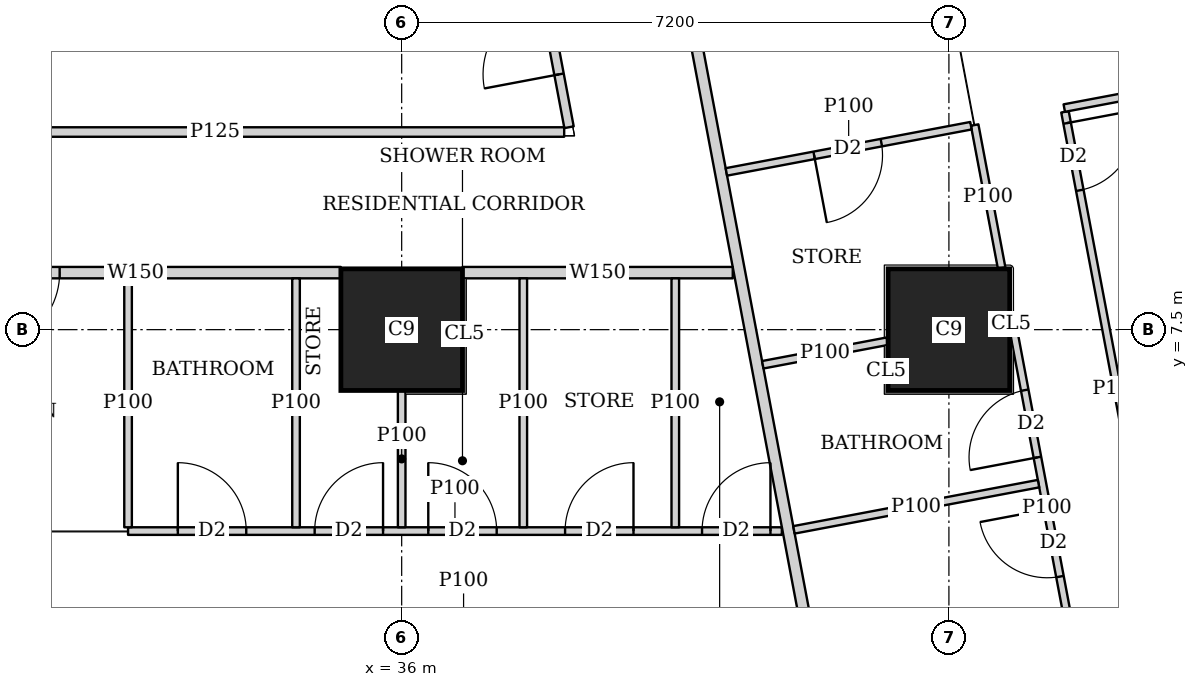
"""IFC4 building model, lengths in metres.
Left out: names, types, materials, properties, quantities, classifications, styles, units other than length and angle.
Written with IfcOpenShell. Run it as: python <this file> out.ifc"""

import sys

from ifc_helpers import new_model, si_unit, direction, frame, frame_2d, origin, origin_2d, place, context, subcontext, project, spatial, rectangle, extrude, element, fill, save


model = new_model("IFC4")
c1 = context("Model", 3, precision=1e-05, world=origin(), true_north=direction((0.0, 1.0)))
c2 = subcontext(c1, "Body", "Model", "MODEL_VIEW")
j1 = project(units=[si_unit("LENGTHUNIT", "METRE"), si_unit("PLANEANGLEUNIT", "RADIAN")], contexts=[c1])
p1 = place(None, origin())
s1 = spatial("IfcSite", under=j1, at=p1, CompositionType="ELEMENT")
p2 = place(p1, origin())
s2 = spatial("IfcBuilding", under=s1, at=p2, CompositionType="ELEMENT")
p3 = place(p2, frame((0.0, 0.0, 77.9)))
s3 = spatial("IfcBuildingStorey", under=s2, at=p3, CompositionType="ELEMENT", Elevation=77.9)
for number, where, z_axis, x_axis in (
    (1, (36.0, 7.5, 0.0), (0.0, 0.0, 1.0), (1.0, 0.0, 0.0)),
    (2, (43.2, 7.5, 0.0), (0.0, 0.0, 1.0), (1.0, 0.0, 0.0)),
):
    element("IfcColumn", number, at=place(p3, frame(where, z_axis=z_axis, x_axis=x_axis)), inside=s3, PredefinedType="COLUMN", context=c2, shape_type="SweptSolid", body=[
        extrude(rectangle(XDim=1.6, YDim=1.6, at=origin_2d()), origin(), (0.0, 0.0, 1.0), 3.75),
    ])
p4 = place(p3, frame((50.653, 2.703, 0.0), z_axis=(0.0, 0.0, 1.0), x_axis=(-0.185612026696, 0.982623109613, 0.0)))
e3 = element("IfcWall", 3, at=p4, inside=s3, PredefinedType="SOLIDWALL", context=c2, shape_type="SweptSolid", body=[
    extrude(rectangle(XDim=41.393, YDim=0.2, at=frame_2d((20.697, 0.0))), origin(), (0.0, 0.0, 1.0), 3.5),
])
p5 = place(p4, frame((1.633, 0.0, 0.9)))
e4 = element("IfcOpeningElement", 4, at=p5, cuts=e3, PredefinedType="OPENING", context=c2, shape_type="SweptSolid", body=[
    extrude(rectangle(XDim=1.8, YDim=1.5, at=frame_2d((0.9, 0.75))), frame((0.0, 0.11, 0.0), z_axis=(0.0, -1.0, 0.0), x_axis=(1.0, 0.0, 0.0)), (0.0, 0.0, 1.0), 0.22),
])
p6 = place(p4, frame((6.032, 0.0, 0.9)))
e5 = element("IfcOpeningElement", 5, at=p6, cuts=e3, PredefinedType="OPENING", context=c2, shape_type="SweptSolid", body=[
    extrude(rectangle(XDim=1.8, YDim=1.5, at=frame_2d((0.9, 0.75))), frame((0.0, 0.11, 0.0), z_axis=(0.0, -1.0, 0.0), x_axis=(1.0, 0.0, 0.0)), (0.0, 0.0, 1.0), 0.22),
])
p7 = place(p4, frame((9.848, 0.0, 0.9)))
e6 = element("IfcOpeningElement", 6, at=p7, cuts=e3, PredefinedType="OPENING", context=c2, shape_type="SweptSolid", body=[
    extrude(rectangle(XDim=1.8, YDim=1.5, at=frame_2d((0.9, 0.75))), frame((0.0, 0.11, 0.0), z_axis=(0.0, -1.0, 0.0), x_axis=(1.0, 0.0, 0.0)), (0.0, 0.0, 1.0), 0.22),
])
p8 = place(p4, frame((13.664, 0.0, 0.9)))
e7 = element("IfcOpeningElement", 7, at=p8, cuts=e3, PredefinedType="OPENING", context=c2, shape_type="SweptSolid", body=[
    extrude(rectangle(XDim=1.8, YDim=1.5, at=frame_2d((0.9, 0.75))), frame((0.0, 0.11, 0.0), z_axis=(0.0, -1.0, 0.0), x_axis=(1.0, 0.0, 0.0)), (0.0, 0.0, 1.0), 0.22),
])
p9 = place(p4, frame((17.481, 0.0, 0.9)))
e8 = element("IfcOpeningElement", 8, at=p9, cuts=e3, PredefinedType="OPENING", context=c2, shape_type="SweptSolid", body=[
    extrude(rectangle(XDim=1.8, YDim=1.5, at=frame_2d((0.9, 0.75))), frame((0.0, 0.11, 0.0), z_axis=(0.0, -1.0, 0.0), x_axis=(1.0, 0.0, 0.0)), (0.0, 0.0, 1.0), 0.22),
])
p10 = place(p4, frame((21.297, 0.0, 0.9)))
e9 = element("IfcOpeningElement", 9, at=p10, cuts=e3, PredefinedType="OPENING", context=c2, shape_type="SweptSolid", body=[
    extrude(rectangle(XDim=1.8, YDim=1.5, at=frame_2d((0.9, 0.75))), frame((0.0, 0.11, 0.0), z_axis=(0.0, -1.0, 0.0), x_axis=(1.0, 0.0, 0.0)), (0.0, 0.0, 1.0), 0.22),
])
p11 = place(p4, frame((25.113, 0.0, 0.9)))
e10 = element("IfcOpeningElement", 10, at=p11, cuts=e3, PredefinedType="OPENING", context=c2, shape_type="SweptSolid", body=[
    extrude(rectangle(XDim=1.8, YDim=1.5, at=frame_2d((0.9, 0.75))), frame((0.0, 0.11, 0.0), z_axis=(0.0, -1.0, 0.0), x_axis=(1.0, 0.0, 0.0)), (0.0, 0.0, 1.0), 0.22),
])
p12 = place(p4, frame((28.93, 0.0, 0.9)))
e11 = element("IfcOpeningElement", 11, at=p12, cuts=e3, PredefinedType="OPENING", context=c2, shape_type="SweptSolid", body=[
    extrude(rectangle(XDim=1.8, YDim=1.5, at=frame_2d((0.9, 0.75))), frame((0.0, 0.11, 0.0), z_axis=(0.0, -1.0, 0.0), x_axis=(1.0, 0.0, 0.0)), (0.0, 0.0, 1.0), 0.22),
])
p13 = place(p4, frame((32.746, 0.0, 0.9)))
e12 = element("IfcOpeningElement", 12, at=p13, cuts=e3, PredefinedType="OPENING", context=c2, shape_type="SweptSolid", body=[
    extrude(rectangle(XDim=1.8, YDim=1.5, at=frame_2d((0.9, 0.75))), frame((0.0, 0.11, 0.0), z_axis=(0.0, -1.0, 0.0), x_axis=(1.0, 0.0, 0.0)), (0.0, 0.0, 1.0), 0.22),
])
p14 = place(p4, frame((36.481, 0.0, 0.9)))
e13 = element("IfcOpeningElement", 13, at=p14, cuts=e3, PredefinedType="OPENING", context=c2, shape_type="SweptSolid", body=[
    extrude(rectangle(XDim=1.8, YDim=1.5, at=frame_2d((0.9, 0.75))), frame((0.0, 0.11, 0.0), z_axis=(0.0, -1.0, 0.0), x_axis=(1.0, 0.0, 0.0)), (0.0, 0.0, 1.0), 0.22),
])
p15 = place(p3, frame((40.356, 8.25, 0.0), z_axis=(0.0, 0.0, 1.0), x_axis=(-1.0, 0.0, 0.0)))
e14 = element("IfcWall", 14, at=p15, inside=s3, PredefinedType="SOLIDWALL", context=c2, shape_type="SweptSolid", body=[
    extrude(rectangle(XDim=3.555, YDim=0.15, at=frame_2d((1.777, 0.0))), origin(), (0.0, 0.0, 1.0), 3.5),
])
p16 = place(p3, frame((35.199, 8.25, 0.0), z_axis=(0.0, 0.0, 1.0), x_axis=(-1.0, 0.0, 0.0)))
e15 = element("IfcWall", 15, at=p16, inside=s3, PredefinedType="SOLIDWALL", context=c2, shape_type="SweptSolid", body=[
    extrude(rectangle(XDim=5.398, YDim=0.15, at=frame_2d((2.699, 0.0))), origin(), (0.0, 0.0, 1.0), 3.5),
])
p17 = place(p16, frame((3.699, 0.0, 0.0)))
e16 = element("IfcOpeningElement", 16, at=p17, cuts=e15, PredefinedType="OPENING", context=c2, shape_type="SweptSolid", body=[
    extrude(rectangle(XDim=1.0, YDim=2.1, at=frame_2d((0.5, 1.05))), frame((0.0, 0.085, 0.0), z_axis=(0.0, -1.0, 0.0), x_axis=(1.0, 0.0, 0.0)), (0.0, 0.0, 1.0), 0.17),
])
p18 = place(p3, frame((33.382, 45.65, 0.0), z_axis=(0.0, 0.0, 1.0), x_axis=(0.185593544777, -0.982626600565, 0.0)))
e17 = element("IfcWall", 17, at=p18, inside=s3, PredefinedType="SOLIDWALL", context=c2, shape_type="SweptSolid", body=[
    extrude(rectangle(XDim=47.118, YDim=0.15, at=frame_2d((23.559, 0.0))), origin(), (0.0, 0.0, 1.0), 2.2),
])
p19 = place(p18, frame((19.054, 0.0, 0.0)))
e18 = element("IfcOpeningElement", 18, at=p19, cuts=e17, PredefinedType="OPENING", context=c2, shape_type="SweptSolid", body=[
    extrude(rectangle(XDim=1.0, YDim=2.1, at=frame_2d((0.5, 1.05))), frame((0.0, 0.085, 0.0), z_axis=(0.0, -1.0, 0.0), x_axis=(1.0, 0.0, 0.0)), (0.0, 0.0, 1.0), 0.17),
])
p20 = place(p18, frame((22.87, 0.0, 0.0)))
e19 = element("IfcOpeningElement", 19, at=p20, cuts=e17, PredefinedType="OPENING", context=c2, shape_type="SweptSolid", body=[
    extrude(rectangle(XDim=1.0, YDim=2.1, at=frame_2d((0.5, 1.05))), frame((0.0, 0.085, 0.0), z_axis=(0.0, -1.0, 0.0), x_axis=(1.0, 0.0, 0.0)), (0.0, 0.0, 1.0), 0.17),
])
p21 = place(p18, frame((33.833, 0.0, 0.0)))
e20 = element("IfcOpeningElement", 20, at=p21, cuts=e17, PredefinedType="OPENING", context=c2, shape_type="SweptSolid", body=[
    extrude(rectangle(XDim=1.0, YDim=2.1, at=frame_2d((0.5, 1.05))), frame((0.0, 0.085, 0.0), z_axis=(0.0, -1.0, 0.0), x_axis=(1.0, 0.0, 0.0)), (0.0, 0.0, 1.0), 0.17),
])
p22 = place(p3, frame((41.002, 4.85, 0.0), z_axis=(0.0, 0.0, 1.0), x_axis=(-1.0, 0.0, 0.0)))
e21 = element("IfcWall", 21, at=p22, inside=s3, PredefinedType="PARTITIONING", context=c2, shape_type="SweptSolid", body=[
    extrude(rectangle(XDim=8.602, YDim=0.1, at=frame_2d((4.301, 0.0))), origin(), (0.0, 0.0, 1.0), 3.5),
])
p23 = place(p22, frame((7.047, 0.0, 0.0)))
e22 = element("IfcOpeningElement", 22, at=p23, cuts=e21, PredefinedType="OPENING", context=c2, shape_type="SweptSolid", body=[
    extrude(rectangle(XDim=0.9, YDim=2.1, at=frame_2d((0.45, 1.05))), frame((0.0, 0.06, 0.0), z_axis=(0.0, -1.0, 0.0), x_axis=(1.0, 0.0, 0.0)), (0.0, 0.0, 1.0), 0.12),
])
p24 = place(p22, frame((3.752, 0.0, 0.0)))
e23 = element("IfcOpeningElement", 23, at=p24, cuts=e21, PredefinedType="OPENING", context=c2, shape_type="SweptSolid", body=[
    extrude(rectangle(XDim=0.9, YDim=2.1, at=frame_2d((0.45, 1.05))), frame((0.0, 0.06, 0.0), z_axis=(0.0, -1.0, 0.0), x_axis=(1.0, 0.0, 0.0)), (0.0, 0.0, 1.0), 0.12),
])
p25 = place(p22, frame((0.15, 0.0, 0.0)))
e24 = element("IfcOpeningElement", 24, at=p25, cuts=e21, PredefinedType="OPENING", context=c2, shape_type="SweptSolid", body=[
    extrude(rectangle(XDim=0.9, YDim=2.1, at=frame_2d((0.45, 1.05))), frame((0.0, 0.06, 0.0), z_axis=(0.0, -1.0, 0.0), x_axis=(1.0, 0.0, 0.0)), (0.0, 0.0, 1.0), 0.12),
])
p26 = place(p22, frame((5.247, 0.0, 0.0)))
e25 = element("IfcOpeningElement", 25, at=p26, cuts=e21, PredefinedType="OPENING", context=c2, shape_type="SweptSolid", body=[
    extrude(rectangle(XDim=0.9, YDim=2.1, at=frame_2d((0.45, 1.05))), frame((0.0, 0.06, 0.0), z_axis=(0.0, -1.0, 0.0), x_axis=(1.0, 0.0, 0.0)), (0.0, 0.0, 1.0), 0.12),
])
p27 = place(p22, frame((1.952, 0.0, 0.0)))
e26 = element("IfcOpeningElement", 26, at=p27, cuts=e21, PredefinedType="OPENING", context=c2, shape_type="SweptSolid", body=[
    extrude(rectangle(XDim=0.9, YDim=2.1, at=frame_2d((0.45, 1.05))), frame((0.0, 0.06, 0.0), z_axis=(0.0, -1.0, 0.0), x_axis=(1.0, 0.0, 0.0)), (0.0, 0.0, 1.0), 0.12),
])
p28 = place(p3, frame((32.4, 4.9, 0.0), z_axis=(0.0, 0.0, 1.0), x_axis=(0.0, 1.0, 0.0)))
e27 = element("IfcWall", 27, at=p28, inside=s3, PredefinedType="PARTITIONING", context=c2, shape_type="SweptSolid", body=[
    extrude(rectangle(XDim=3.275, YDim=0.1, at=frame_2d((1.638, 0.0))), origin(), (0.0, 0.0, 1.0), 3.5),
])
p29 = place(p3, frame((36.0, 4.9, 0.0), z_axis=(0.0, 0.0, 1.0), x_axis=(0.0, 1.0, 0.0)))
e28 = element("IfcWall", 28, at=p29, inside=s3, PredefinedType="PARTITIONING", context=c2, shape_type="SweptSolid", body=[
    extrude(rectangle(XDim=1.799, YDim=0.1, at=frame_2d((0.899, 0.0))), origin(), (0.0, 0.0, 1.0), 3.5),
])
for number, where, z_axis, x_axis in (
    (29, (39.6, 4.9, 0.0), (0.0, 0.0, 1.0), (0.0, 1.0, 0.0)),
    (30, (34.61, 4.9, 0.0), (0.0, 0.0, 1.0), (0.0, 1.0, 0.0)),
    (31, (37.6, 4.9, 0.0), (0.0, 0.0, 1.0), (0.0, 1.0, 0.0)),
):
    element("IfcWall", number, at=place(p3, frame(where, z_axis=z_axis, x_axis=x_axis)), inside=s3, PredefinedType="PARTITIONING", context=c2, shape_type="SweptSolid", body=[
        extrude(rectangle(XDim=3.275, YDim=0.1, at=frame_2d((1.638, 0.0))), origin(), (0.0, 0.0, 1.0), 3.5),
    ])
p30 = place(p3, frame((44.727, 10.366, 0.0), z_axis=(0.0, 0.0, 1.0), x_axis=(0.185678775129, -0.982610498858, 0.0)))
e32 = element("IfcWall", 32, at=p30, inside=s3, PredefinedType="PARTITIONING", context=c2, shape_type="SweptSolid", body=[
    extrude(rectangle(XDim=7.421, YDim=0.1, at=frame_2d((3.71, 0.0))), origin(), (0.0, 0.0, 1.0), 3.5),
])
p31 = place(p30, frame((0.151, 0.0, 0.0)))
e33 = element("IfcOpeningElement", 33, at=p31, cuts=e32, PredefinedType="OPENING", context=c2, shape_type="SweptSolid", body=[
    extrude(rectangle(XDim=0.9, YDim=2.1, at=frame_2d((0.45, 1.05))), frame((0.0, 0.06, 0.0), z_axis=(0.0, -1.0, 0.0), x_axis=(1.0, 0.0, 0.0)), (0.0, 0.0, 1.0), 0.12),
])
p32 = place(p30, frame((4.55, 0.0, 0.0)))
e34 = element("IfcOpeningElement", 34, at=p32, cuts=e32, PredefinedType="OPENING", context=c2, shape_type="SweptSolid", body=[
    extrude(rectangle(XDim=0.9, YDim=2.1, at=frame_2d((0.45, 1.05))), frame((0.0, 0.06, 0.0), z_axis=(0.0, -1.0, 0.0), x_axis=(1.0, 0.0, 0.0)), (0.0, 0.0, 1.0), 0.12),
])
p33 = place(p3, frame((43.539, 10.192, 0.0), z_axis=(0.0, 0.0, 1.0), x_axis=(0.185366049966, -0.982669541362, 0.0)))
e35 = element("IfcWall", 35, at=p33, inside=s3, PredefinedType="PARTITIONING", context=c2, shape_type="SweptSolid", body=[
    extrude(rectangle(XDim=1.915, YDim=0.1, at=frame_2d((0.958, 0.0))), origin(), (0.0, 0.0, 1.0), 3.5),
])
p34 = place(p3, frame((44.049, 7.49, 0.0), z_axis=(0.0, 0.0, 1.0), x_axis=(0.185666332607, -0.982612849975, 0.0)))
e36 = element("IfcWall", 36, at=p34, inside=s3, PredefinedType="PARTITIONING", context=c2, shape_type="SweptSolid", body=[
    extrude(rectangle(XDim=4.75, YDim=0.1, at=frame_2d((2.375, 0.0))), origin(), (0.0, 0.0, 1.0), 3.5),
])
p35 = place(p34, frame((0.8, 0.0, 0.0)))
e37 = element("IfcOpeningElement", 37, at=p35, cuts=e36, PredefinedType="OPENING", context=c2, shape_type="SweptSolid", body=[
    extrude(rectangle(XDim=0.9, YDim=2.1, at=frame_2d((0.45, 1.05))), frame((0.0, 0.06, 0.0), z_axis=(0.0, -1.0, 0.0), x_axis=(1.0, 0.0, 0.0)), (0.0, 0.0, 1.0), 0.12),
])
p36 = place(p34, frame((2.396, 0.0, 0.0)))
e38 = element("IfcOpeningElement", 38, at=p36, cuts=e36, PredefinedType="OPENING", context=c2, shape_type="SweptSolid", body=[
    extrude(rectangle(XDim=0.9, YDim=2.1, at=frame_2d((0.45, 1.05))), frame((0.0, 0.06, 0.0), z_axis=(0.0, -1.0, 0.0), x_axis=(1.0, 0.0, 0.0)), (0.0, 0.0, 1.0), 0.12),
])
p37 = place(p3, frame((48.943, 11.213, 0.0), z_axis=(0.0, 0.0, 1.0), x_axis=(-0.982633535512, -0.185556823879, 0.0)))
e39 = element("IfcWall", 39, at=p37, inside=s3, PredefinedType="PARTITIONING", context=c2, shape_type="SweptSolid", body=[
    extrude(rectangle(XDim=4.3, YDim=0.1, at=frame_2d((2.15, 0.0))), origin(), (0.0, 0.0, 1.0), 2.2),
])
p38 = place(p3, frame((43.49, 10.183, 0.0), z_axis=(0.0, 0.0, 1.0), x_axis=(-0.982607026909, -0.185697147715, 0.0)))
e40 = element("IfcWall", 40, at=p38, inside=s3, PredefinedType="PARTITIONING", context=c2, shape_type="SweptSolid", body=[
    extrude(rectangle(XDim=3.275, YDim=0.1, at=frame_2d((1.637, 0.0))), origin(), (0.0, 0.0, 1.0), 3.5),
])
p39 = place(p38, frame((1.2, 0.0, 0.0)))
e41 = element("IfcOpeningElement", 41, at=p39, cuts=e40, PredefinedType="OPENING", context=c2, shape_type="SweptSolid", body=[
    extrude(rectangle(XDim=0.9, YDim=2.1, at=frame_2d((0.45, 1.05))), frame((0.0, 0.06, 0.0), z_axis=(0.0, -1.0, 0.0), x_axis=(1.0, 0.0, 0.0)), (0.0, 0.0, 1.0), 0.12),
])
p40 = place(p3, frame((42.39, 7.348, 0.0), z_axis=(0.0, 0.0, 1.0), x_axis=(-0.9825976927, -0.185746532405, 0.0)))
e42 = element("IfcWall", 42, at=p40, inside=s3, PredefinedType="PARTITIONING", context=c2, shape_type="SweptSolid", body=[
    extrude(rectangle(XDim=1.668, YDim=0.1, at=frame_2d((0.834, 0.0))), origin(), (0.0, 0.0, 1.0), 3.5),
])
p41 = place(p3, frame((44.379, 5.474, 0.0), z_axis=(0.0, 0.0, 1.0), x_axis=(-0.982607026909, -0.185697147715, 0.0)))
e43 = element("IfcWall", 43, at=p41, inside=s3, PredefinedType="PARTITIONING", context=c2, shape_type="SweptSolid", body=[
    extrude(rectangle(XDim=3.275, YDim=0.1, at=frame_2d((1.637, 0.0))), origin(), (0.0, 0.0, 1.0), 3.5),
])
p42 = place(p3, frame((28.95, 10.1, 0.0), z_axis=(0.0, 0.0, 1.0), x_axis=(1.0, 0.0, 0.0)))
e44 = element("IfcWall", 44, at=p42, inside=s3, PredefinedType="PARTITIONING", context=c2, shape_type="SweptSolid", body=[
    extrude(rectangle(XDim=9.188, YDim=0.125, at=frame_2d((4.594, 0.0))), origin(), (0.0, 0.0, 1.0), 3.5),
])
p43 = place(p3, frame((38.202, 10.163, 0.0), z_axis=(0.0, 0.0, 1.0), x_axis=(-0.185645577403, 0.982616771479, 0.0)))
e45 = element("IfcWall", 45, at=p43, inside=s3, PredefinedType="PARTITIONING", context=c2, shape_type="SweptSolid", body=[
    extrude(rectangle(XDim=12.555, YDim=0.125, at=frame_2d((6.278, 0.0))), origin(), (0.0, 0.0, 1.0), 2.5),
])
p44 = place(p43, frame((0.708, 0.0, 0.0)))
e46 = element("IfcOpeningElement", 46, at=p44, cuts=e45, PredefinedType="OPENING", context=c2, shape_type="SweptSolid", body=[
    extrude(rectangle(XDim=1.0, YDim=2.1, at=frame_2d((0.5, 1.05))), frame((0.0, 0.073, 0.0), z_axis=(0.0, -1.0, 0.0), x_axis=(1.0, 0.0, 0.0)), (0.0, 0.0, 1.0), 0.145),
])
p45 = place(p43, frame((6.0, 0.0, 0.0)))
e47 = element("IfcOpeningElement", 47, at=p45, cuts=e45, PredefinedType="OPENING", context=c2, shape_type="SweptSolid", body=[
    extrude(rectangle(XDim=1.0, YDim=2.1, at=frame_2d((0.5, 1.05))), frame((0.0, 0.073, 0.0), z_axis=(0.0, -1.0, 0.0), x_axis=(1.0, 0.0, 0.0)), (0.0, 0.0, 1.0), 0.145),
])
p46 = place(p43, frame((9.562, 0.0, 0.0)))
e48 = element("IfcOpeningElement", 48, at=p46, cuts=e45, PredefinedType="OPENING", context=c2, shape_type="SweptSolid", body=[
    extrude(rectangle(XDim=1.0, YDim=2.1, at=frame_2d((0.5, 1.05))), frame((0.0, 0.073, 0.0), z_axis=(0.0, -1.0, 0.0), x_axis=(1.0, 0.0, 0.0)), (0.0, 0.0, 1.0), 0.145),
])
p47 = place(p23, origin())
e49 = element("IfcDoor", 49, at=p47, inside=s3, OperationType="SINGLE_SWING_LEFT", PredefinedType="DOOR", context=c2, shape_type="SweptSolid", body=[
    extrude(rectangle(XDim=0.9, YDim=2.1, at=frame_2d((0.45, 1.05))), frame((0.0, 0.025, 0.0), z_axis=(0.0, -1.0, 0.0), x_axis=(1.0, 0.0, 0.0)), (0.0, 0.0, 1.0), 0.05),
])
fill(e22, e49)
p48 = place(p24, origin())
e50 = element("IfcDoor", 50, at=p48, inside=s3, OperationType="SINGLE_SWING_LEFT", PredefinedType="DOOR", context=c2, shape_type="SweptSolid", body=[
    extrude(rectangle(XDim=0.9, YDim=2.1, at=frame_2d((0.45, 1.05))), frame((0.0, 0.025, 0.0), z_axis=(0.0, -1.0, 0.0), x_axis=(1.0, 0.0, 0.0)), (0.0, 0.0, 1.0), 0.05),
])
fill(e23, e50)
p49 = place(p25, origin())
e51 = element("IfcDoor", 51, at=p49, inside=s3, OperationType="SINGLE_SWING_RIGHT", PredefinedType="DOOR", context=c2, shape_type="SweptSolid", body=[
    extrude(rectangle(XDim=0.9, YDim=2.1, at=frame_2d((0.45, 1.05))), frame((0.0, 0.025, 0.0), z_axis=(0.0, -1.0, 0.0), x_axis=(1.0, 0.0, 0.0)), (0.0, 0.0, 1.0), 0.05),
])
fill(e24, e51)
p50 = place(p26, origin())
e52 = element("IfcDoor", 52, at=p50, inside=s3, OperationType="SINGLE_SWING_RIGHT", PredefinedType="DOOR", context=c2, shape_type="SweptSolid", body=[
    extrude(rectangle(XDim=0.9, YDim=2.1, at=frame_2d((0.45, 1.05))), frame((0.0, 0.025, 0.0), z_axis=(0.0, -1.0, 0.0), x_axis=(1.0, 0.0, 0.0)), (0.0, 0.0, 1.0), 0.05),
])
fill(e25, e52)
p51 = place(p27, origin())
e53 = element("IfcDoor", 53, at=p51, inside=s3, OperationType="SINGLE_SWING_RIGHT", PredefinedType="DOOR", context=c2, shape_type="SweptSolid", body=[
    extrude(rectangle(XDim=0.9, YDim=2.1, at=frame_2d((0.45, 1.05))), frame((0.0, 0.025, 0.0), z_axis=(0.0, -1.0, 0.0), x_axis=(1.0, 0.0, 0.0)), (0.0, 0.0, 1.0), 0.05),
])
fill(e26, e53)
p52 = place(p17, origin())
e54 = element("IfcDoor", 54, at=p52, inside=s3, OperationType="SINGLE_SWING_RIGHT", PredefinedType="DOOR", context=c2, shape_type="SweptSolid", body=[
    extrude(rectangle(XDim=1.0, YDim=2.1, at=frame_2d((0.5, 1.05))), frame((0.0, 0.025, 0.0), z_axis=(0.0, -1.0, 0.0), x_axis=(1.0, 0.0, 0.0)), (0.0, 0.0, 1.0), 0.05),
])
fill(e16, e54)
p53 = place(p31, origin())
e55 = element("IfcDoor", 55, at=p53, inside=s3, OperationType="SINGLE_SWING_LEFT", PredefinedType="DOOR", context=c2, shape_type="SweptSolid", body=[
    extrude(rectangle(XDim=0.9, YDim=2.1, at=frame_2d((0.45, 1.05))), frame((0.0, 0.025, 0.0), z_axis=(0.0, -1.0, 0.0), x_axis=(1.0, 0.0, 0.0)), (0.0, 0.0, 1.0), 0.05),
])
fill(e33, e55)
p54 = place(p35, origin())
e56 = element("IfcDoor", 56, at=p54, inside=s3, OperationType="SINGLE_SWING_LEFT", PredefinedType="DOOR", context=c2, shape_type="SweptSolid", body=[
    extrude(rectangle(XDim=0.9, YDim=2.1, at=frame_2d((0.45, 1.05))), frame((0.0, 0.025, 0.0), z_axis=(0.0, -1.0, 0.0), x_axis=(1.0, 0.0, 0.0)), (0.0, 0.0, 1.0), 0.05),
])
fill(e37, e56)
p55 = place(p36, origin())
e57 = element("IfcDoor", 57, at=p55, inside=s3, OperationType="SINGLE_SWING_RIGHT", PredefinedType="DOOR", context=c2, shape_type="SweptSolid", body=[
    extrude(rectangle(XDim=0.9, YDim=2.1, at=frame_2d((0.45, 1.05))), frame((0.0, 0.025, 0.0), z_axis=(0.0, -1.0, 0.0), x_axis=(1.0, 0.0, 0.0)), (0.0, 0.0, 1.0), 0.05),
])
fill(e38, e57)
p56 = place(p39, origin())
e58 = element("IfcDoor", 58, at=p56, inside=s3, OperationType="SINGLE_SWING_RIGHT", PredefinedType="DOOR", context=c2, shape_type="SweptSolid", body=[
    extrude(rectangle(XDim=0.9, YDim=2.1, at=frame_2d((0.45, 1.05))), frame((0.0, 0.025, 0.0), z_axis=(0.0, -1.0, 0.0), x_axis=(1.0, 0.0, 0.0)), (0.0, 0.0, 1.0), 0.05),
])
fill(e41, e58)
p57 = place(p44, origin())
e59 = element("IfcDoor", 59, at=p57, inside=s3, OperationType="SINGLE_SWING_LEFT", PredefinedType="DOOR", context=c2, shape_type="SweptSolid", body=[
    extrude(rectangle(XDim=1.0, YDim=2.1, at=frame_2d((0.5, 1.05))), frame((0.0, 0.025, 0.0), z_axis=(0.0, -1.0, 0.0), x_axis=(1.0, 0.0, 0.0)), (0.0, 0.0, 1.0), 0.05),
])
fill(e46, e59)
save(model, sys.argv[1])
